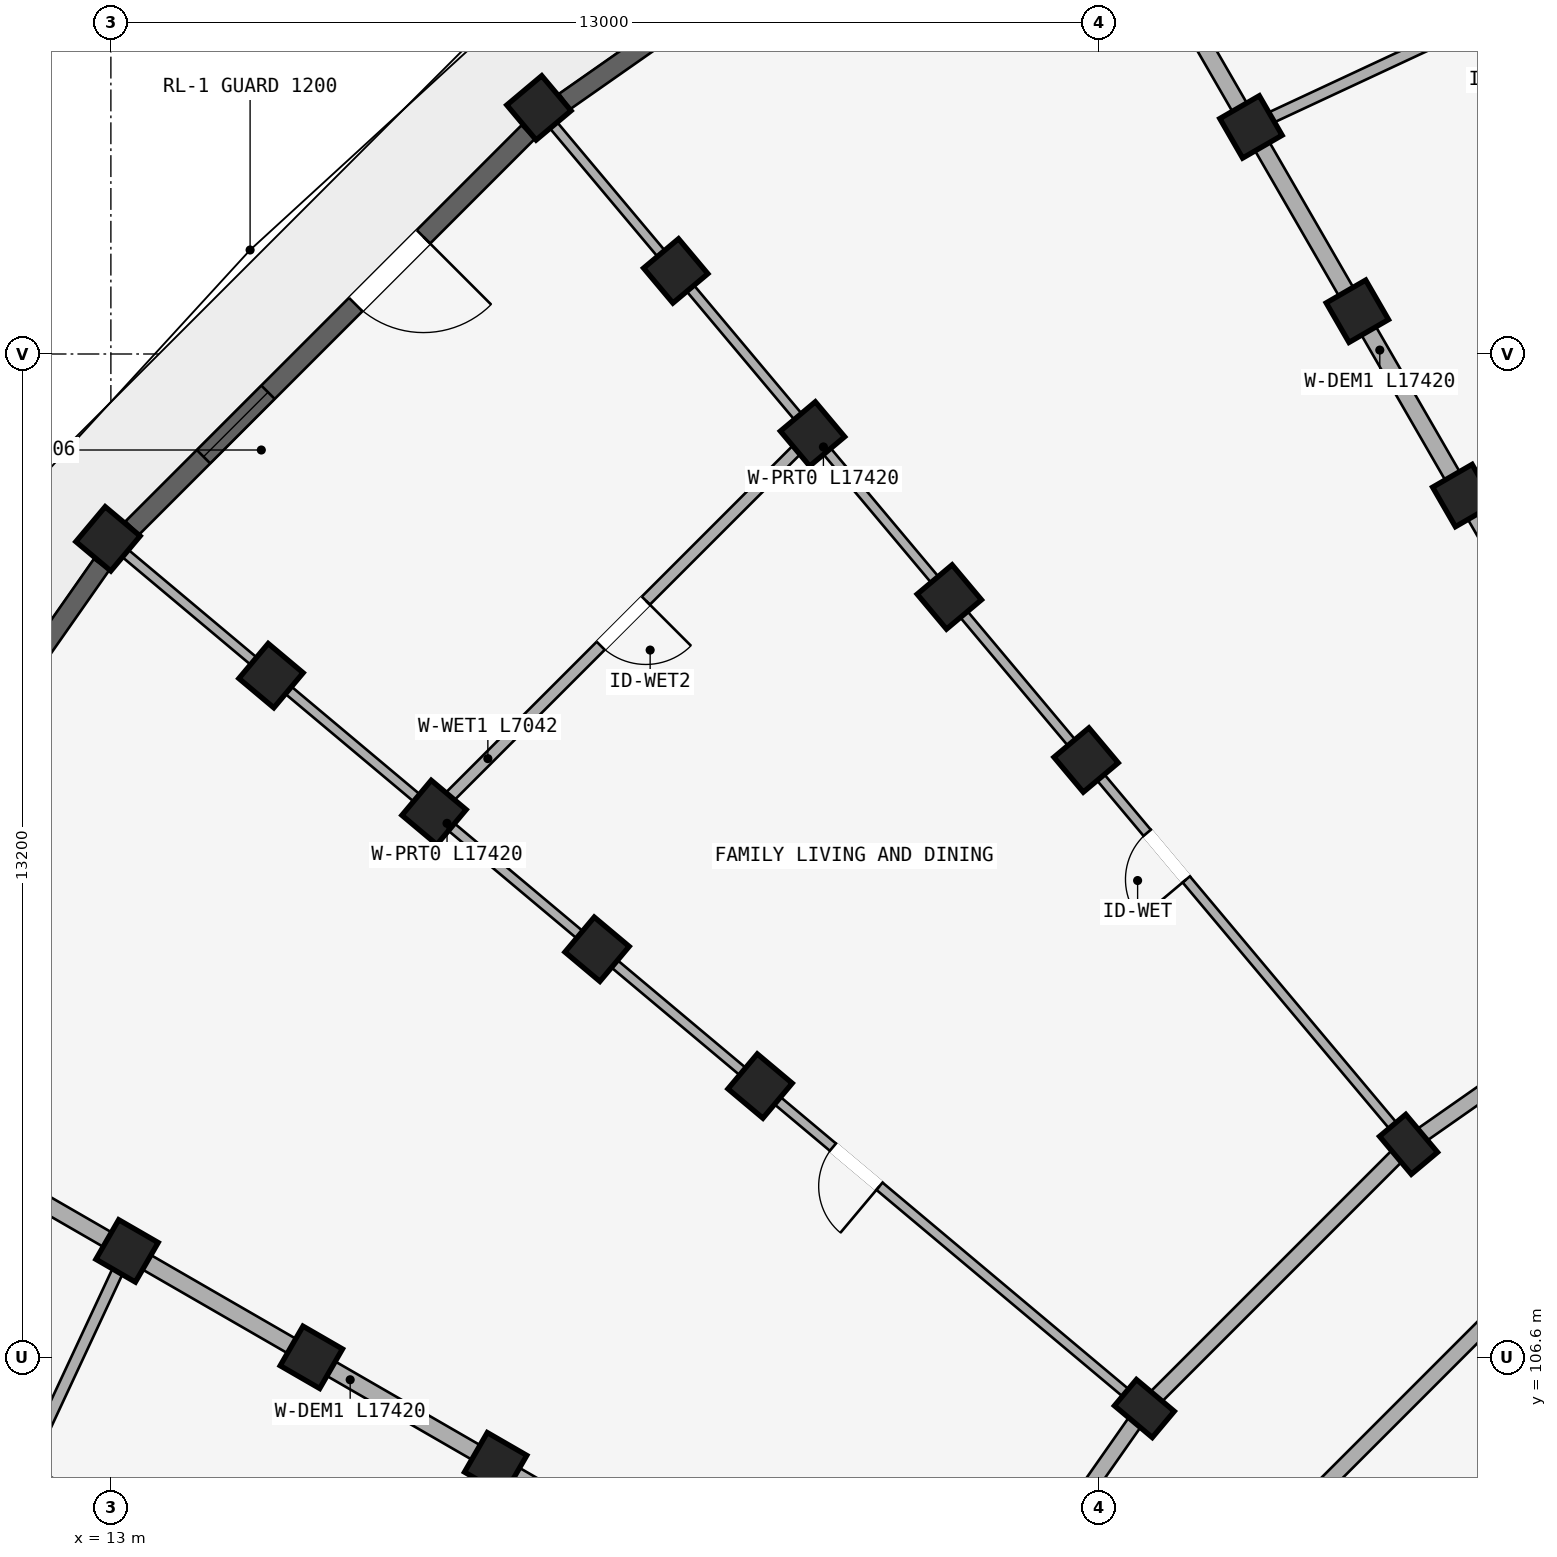
"""IFC4 building model, lengths in metres.
Left out: names, types, materials, properties, quantities, classifications, styles, units other than length and angle.
Written with IfcOpenShell. Run it as: python <this file> out.ifc"""

import sys

from ifc_helpers import new_model, si_unit, direction, frame, frame_2d, origin, origin_2d, place, context, subcontext, project, spatial, rectangle, extrude, element, fill, save


model = new_model("IFC4")
c1 = context("Model", 3, precision=1e-05, world=origin(), true_north=direction((0.0, 1.0)))
c2 = subcontext(c1, "Body", "Model", "MODEL_VIEW")
j1 = project(units=[si_unit("LENGTHUNIT", "METRE"), si_unit("PLANEANGLEUNIT", "RADIAN")], contexts=[c1])
p1 = place(None, origin())
s1 = spatial("IfcSite", under=j1, at=p1, CompositionType="ELEMENT")
p2 = place(p1, origin())
s2 = spatial("IfcBuilding", under=s1, at=p2, CompositionType="ELEMENT")
p3 = place(p2, frame((0.0, 0.0, 30.75)))
s3 = spatial("IfcBuildingStorey", under=s2, at=p3, CompositionType="ELEMENT", Elevation=30.75)
for number, where, z_axis, x_axis in (
    (1, (30.8, 117.938, 0.0), (0.0, 0.0, 1.0), (0.866, 0.5, 0.0)),
    (2, (29.4, 120.363, 0.0), (0.0, 0.0, 1.0), (0.866, 0.5, 0.0)),
    (3, (28.0, 122.787, 0.0), (0.0, 0.0, 1.0), (0.866, 0.5, 0.0)),
):
    element("IfcColumn", number, at=place(p3, frame(where, z_axis=z_axis, x_axis=x_axis)), inside=s3, PredefinedType="COLUMN", context=c2, shape_type="SweptSolid", body=[
        extrude(rectangle(XDim=0.6, YDim=0.6, at=origin_2d()), origin(), (0.0, 0.0, 1.0), 2.93),
    ])
p4 = place(p3, frame((30.073, 109.402, 0.0), z_axis=(0.0, 0.0, 1.0), x_axis=(0.766044443119, 0.642787609687, 0.0)))
e4 = element("IfcColumn", 4, at=p4, inside=s3, PredefinedType="COLUMN", context=c2, shape_type="SweptSolid", body=[
    extrude(rectangle(XDim=0.45, YDim=0.65, at=origin_2d()), origin(), (0.0, 0.0, 1.0), 2.93),
])
for number, where, z_axis, x_axis in (
    (5, (25.831, 114.458, 0.0), (0.0, 0.0, 1.0), (0.766, 0.643, 0.0)),
    (6, (24.031, 116.603, 0.0), (0.0, 0.0, 1.0), (0.766, 0.643, 0.0)),
    (7, (22.231, 118.748, 0.0), (0.0, 0.0, 1.0), (0.766, 0.643, 0.0)),
    (8, (20.432, 120.893, 0.0), (0.0, 0.0, 1.0), (0.766, 0.643, 0.0)),
    (9, (18.632, 123.038, 0.0), (0.0, 0.0, 1.0), (0.766, 0.643, 0.0)),
):
    element("IfcColumn", number, at=place(p3, frame(where, z_axis=z_axis, x_axis=x_axis)), inside=s3, PredefinedType="COLUMN", context=c2, shape_type="SweptSolid", body=[
        extrude(rectangle(XDim=0.6, YDim=0.6, at=origin_2d()), origin(), (0.0, 0.0, 1.0), 2.93),
    ])
p5 = place(p3, frame((26.598, 105.927, 0.0), z_axis=(0.0, 0.0, 1.0), x_axis=(0.642787609687, 0.766044443119, 0.0)))
e10 = element("IfcColumn", 10, at=p5, inside=s3, PredefinedType="COLUMN", context=c2, shape_type="SweptSolid", body=[
    extrude(rectangle(XDim=0.45, YDim=0.65, at=origin_2d()), origin(), (0.0, 0.0, 1.0), 2.93),
])
for number, where, z_axis, x_axis in (
    (11, (21.542, 110.169, 0.0), (0.0, 0.0, 1.0), (0.643, 0.766, 0.0)),
    (12, (19.397, 111.969, 0.0), (0.0, 0.0, 1.0), (0.643, 0.766, 0.0)),
    (13, (17.252, 113.769, 0.0), (0.0, 0.0, 1.0), (0.643, 0.766, 0.0)),
    (14, (15.107, 115.568, 0.0), (0.0, 0.0, 1.0), (0.643, 0.766, 0.0)),
    (15, (12.962, 117.368, 0.0), (0.0, 0.0, 1.0), (0.643, 0.766, 0.0)),
    (16, (18.062, 105.2, 0.0), (0.0, 0.0, 1.0), (0.5, 0.866, 0.0)),
    (17, (15.637, 106.6, 0.0), (0.0, 0.0, 1.0), (0.5, 0.866, 0.0)),
    (18, (13.213, 108.0, 0.0), (0.0, 0.0, 1.0), (0.5, 0.866, 0.0)),
):
    element("IfcColumn", number, at=place(p3, frame(where, z_axis=z_axis, x_axis=x_axis)), inside=s3, PredefinedType="COLUMN", context=c2, shape_type="SweptSolid", body=[
        extrude(rectangle(XDim=0.6, YDim=0.6, at=origin_2d()), origin(), (0.0, 0.0, 1.0), 2.93),
    ])
p6 = place(p3, frame((34.1, 112.222, 0.0), z_axis=(0.0, 0.0, 1.0), x_axis=(-0.819140911474, -0.573592335331, 0.0)))
e19 = element("IfcWall", 19, at=p6, inside=s3, PredefinedType="STANDARD", context=c2, shape_type="SweptSolid", body=[
    extrude(rectangle(XDim=4.916, YDim=0.2, at=frame_2d((2.458, 0.0))), origin(), (0.0, 0.0, 1.0), 2.372),
])
p7 = place(p6, frame((1.938, 0.0, 0.0)))
e20 = element("IfcOpeningElement", 20, at=p7, cuts=e19, PredefinedType="OPENING", context=c2, shape_type="SweptSolid", body=[
    extrude(rectangle(XDim=1.04, YDim=2.15, at=frame_2d((0.52, 1.075))), frame((0.0, 0.11, 0.0), z_axis=(0.0, -1.0, 0.0), x_axis=(1.0, 0.0, 0.0)), (0.0, 0.0, 1.0), 0.22),
])
p8 = place(p3, frame((31.616, 107.564, 0.0), z_axis=(0.0, 0.0, 1.0), x_axis=(-0.707106781187, -0.707106781187, 0.0)))
e21 = element("IfcWall", 21, at=p8, inside=s3, PredefinedType="STANDARD", context=c2, shape_type="SweptSolid", body=[
    extrude(rectangle(XDim=4.497, YDim=0.2, at=frame_2d((2.249, 0.0))), origin(), (0.0, 0.0, 1.0), 2.372),
])
p9 = place(p3, frame((30.073, 109.402, 0.0), z_axis=(0.0, 0.0, 1.0), x_axis=(-0.707106781187, -0.707106781187, 0.0)))
e22 = element("IfcWall", 22, at=p9, inside=s3, PredefinedType="STANDARD", context=c2, shape_type="SweptSolid", body=[
    extrude(rectangle(XDim=4.916, YDim=0.2, at=frame_2d((2.458, 0.0))), origin(), (0.0, 0.0, 1.0), 2.372),
])
p10 = place(p3, frame((26.598, 105.927, 0.0), z_axis=(0.0, 0.0, 1.0), x_axis=(-0.573592335331, -0.819140911474, 0.0)))
e23 = element("IfcWall", 23, at=p10, inside=s3, PredefinedType="STANDARD", context=c2, shape_type="SweptSolid", body=[
    extrude(rectangle(XDim=4.916, YDim=0.2, at=frame_2d((2.458, 0.0))), origin(), (0.0, 0.0, 1.0), 2.372),
])
p11 = place(p3, frame((34.05, 112.309, 0.0), z_axis=(0.0, 0.0, 1.0), x_axis=(-0.499997843263, 0.866026648973, 0.0)))
e24 = element("IfcWall", 24, at=p11, inside=s3, PredefinedType="STANDARD", context=c2, shape_type="SweptSolid", body=[
    extrude(rectangle(XDim=17.42, YDim=0.22, at=frame_2d((8.71, 0.0))), origin(), (0.0, 0.0, 1.0), 2.372),
])
p12 = place(p3, frame((30.009, 109.479, 0.0), z_axis=(0.0, 0.0, 1.0), x_axis=(-0.642784757967, 0.766046835987, 0.0)))
e25 = element("IfcWall", 25, at=p12, inside=s3, PredefinedType="PARTITIONING", context=c2, shape_type="SweptSolid", body=[
    extrude(rectangle(XDim=17.42, YDim=0.125, at=frame_2d((8.71, 0.0))), origin(), (0.0, 0.0, 1.0), 2.372),
])
p13 = place(p12, frame((4.45, 0.0, 0.0)))
e26 = element("IfcOpeningElement", 26, at=p13, cuts=e25, PredefinedType="OPENING", context=c2, shape_type="SweptSolid", body=[
    extrude(rectangle(XDim=0.8, YDim=2.1, at=frame_2d((0.4, 1.05))), frame((0.0, 0.073, 0.0), z_axis=(0.0, -1.0, 0.0), x_axis=(1.0, 0.0, 0.0)), (0.0, 0.0, 1.0), 0.145),
])
p14 = place(p3, frame((26.521, 105.991, 0.0), z_axis=(0.0, 0.0, 1.0), x_axis=(-0.766046835987, 0.642784757967, 0.0)))
e27 = element("IfcWall", 27, at=p14, inside=s3, PredefinedType="PARTITIONING", context=c2, shape_type="SweptSolid", body=[
    extrude(rectangle(XDim=17.42, YDim=0.125, at=frame_2d((8.71, 0.0))), origin(), (0.0, 0.0, 1.0), 2.372),
])
p15 = place(p14, frame((4.45, 0.0, 0.0)))
e28 = element("IfcOpeningElement", 28, at=p15, cuts=e27, PredefinedType="OPENING", context=c2, shape_type="SweptSolid", body=[
    extrude(rectangle(XDim=0.8, YDim=2.1, at=frame_2d((0.4, 1.05))), frame((0.0, 0.073, 0.0), z_axis=(0.0, -1.0, 0.0), x_axis=(1.0, 0.0, 0.0)), (0.0, 0.0, 1.0), 0.145),
])
p16 = place(p3, frame((23.691, 101.95, 0.0), z_axis=(0.0, 0.0, 1.0), x_axis=(-0.866026648973, 0.499997843263, 0.0)))
e29 = element("IfcWall", 29, at=p16, inside=s3, PredefinedType="STANDARD", context=c2, shape_type="SweptSolid", body=[
    extrude(rectangle(XDim=17.42, YDim=0.22, at=frame_2d((8.71, 0.0))), origin(), (0.0, 0.0, 1.0), 2.372),
])
p17 = place(p3, frame((34.382, 125.764, 0.0), z_axis=(0.0, 0.0, 1.0), x_axis=(-0.906297360311, -0.422640621205, 0.0)))
e30 = element("IfcWall", 30, at=p17, inside=s3, PredefinedType="PLUMBINGWALL", context=c2, shape_type="SweptSolid", body=[
    extrude(rectangle(XDim=7.042, YDim=0.15, at=frame_2d((3.521, 0.0))), origin(), (0.0, 0.0, 1.0), 2.372),
])
p18 = place(p17, frame((3.141, 0.0, 0.0)))
e31 = element("IfcOpeningElement", 31, at=p18, cuts=e30, PredefinedType="OPENING", context=c2, shape_type="SweptSolid", body=[
    extrude(rectangle(XDim=0.76, YDim=2.05, at=frame_2d((0.38, 1.025))), frame((0.0, 0.085, 0.0), z_axis=(0.0, -1.0, 0.0), x_axis=(1.0, 0.0, 0.0)), (0.0, 0.0, 1.0), 0.17),
])
p19 = place(p3, frame((22.231, 118.748, 0.0), z_axis=(0.0, 0.0, 1.0), x_axis=(-0.707106781187, -0.707106781187, 0.0)))
e32 = element("IfcWall", 32, at=p19, inside=s3, PredefinedType="PLUMBINGWALL", context=c2, shape_type="SweptSolid", body=[
    extrude(rectangle(XDim=7.042, YDim=0.15, at=frame_2d((3.521, 0.0))), origin(), (0.0, 0.0, 1.0), 2.372),
])
p20 = place(p19, frame((3.101, 0.0, 0.0)))
e33 = element("IfcOpeningElement", 33, at=p20, cuts=e32, PredefinedType="OPENING", context=c2, shape_type="SweptSolid", body=[
    extrude(rectangle(XDim=0.84, YDim=2.1, at=frame_2d((0.42, 1.05))), frame((0.0, 0.085, 0.0), z_axis=(0.0, -1.0, 0.0), x_axis=(1.0, 0.0, 0.0)), (0.0, 0.0, 1.0), 0.17),
])
p21 = place(p3, frame((13.213, 108.0, 0.0), z_axis=(0.0, 0.0, 1.0), x_axis=(-0.422640621205, -0.906297360311, 0.0)))
e34 = element("IfcWall", 34, at=p21, inside=s3, PredefinedType="PLUMBINGWALL", context=c2, shape_type="SweptSolid", body=[
    extrude(rectangle(XDim=7.042, YDim=0.15, at=frame_2d((3.521, 0.0))), origin(), (0.0, 0.0, 1.0), 2.372),
])
p22 = place(p21, frame((3.121, 0.0, 0.0)))
e35 = element("IfcOpeningElement", 35, at=p22, cuts=e34, PredefinedType="OPENING", context=c2, shape_type="SweptSolid", body=[
    extrude(rectangle(XDim=0.8, YDim=2.1, at=frame_2d((0.4, 1.05))), frame((0.0, 0.085, 0.0), z_axis=(0.0, -1.0, 0.0), x_axis=(1.0, 0.0, 0.0)), (0.0, 0.0, 1.0), 0.17),
])
p23 = place(p3, frame((25.005, 127.348, 0.0), z_axis=(0.0, 0.0, 1.0), x_axis=(-0.819147839112, -0.573582441919, 0.0)))
e36 = element("IfcWall", 36, at=p23, inside=s3, PredefinedType="STANDARD", context=c2, shape_type="SweptSolid", body=[
    extrude(rectangle(XDim=7.367, YDim=0.25, at=frame_2d((3.684, 0.0))), origin(), (0.0, 0.0, 1.0), 2.372),
])
p24 = place(p23, frame((2.783, 0.0, 0.522)))
e37 = element("IfcOpeningElement", 37, at=p24, cuts=e36, PredefinedType="OPENING", context=c2, shape_type="SweptSolid", body=[
    extrude(rectangle(XDim=1.8, YDim=1.65, at=frame_2d((0.9, 0.825))), frame((0.0, 0.135, 0.0), z_axis=(0.0, -1.0, 0.0), x_axis=(1.0, 0.0, 0.0)), (0.0, 0.0, 1.0), 0.27),
])
p25 = place(p3, frame((18.49, 122.719, 0.0), z_axis=(0.0, 0.0, 1.0), x_axis=(-0.707106781187, -0.707106781187, 0.0)))
e38 = element("IfcWall", 38, at=p25, inside=s3, PredefinedType="STANDARD", context=c2, shape_type="SweptSolid", body=[
    extrude(rectangle(XDim=7.367, YDim=0.25, at=frame_2d((3.684, 0.0))), origin(), (0.0, 0.0, 1.0), 2.372),
])
p26 = place(p25, frame((4.84, 0.0, 0.422)))
e39 = element("IfcOpeningElement", 39, at=p26, cuts=e38, PredefinedType="OPENING", context=c2, shape_type="SweptSolid", body=[
    extrude(rectangle(XDim=1.2, YDim=1.5, at=frame_2d((0.6, 0.75))), frame((0.0, 0.135, 0.0), z_axis=(0.0, -1.0, 0.0), x_axis=(1.0, 0.0, 0.0)), (0.0, 0.0, 1.0), 0.27),
])
p27 = place(p25, frame((1.948, 0.0, 0.0)))
e40 = element("IfcOpeningElement", 40, at=p27, cuts=e38, PredefinedType="OPENING", context=c2, shape_type="SweptSolid", body=[
    extrude(rectangle(XDim=1.26, YDim=2.15, at=frame_2d((0.63, 1.075))), frame((0.0, 0.135, 0.0), z_axis=(0.0, -1.0, 0.0), x_axis=(1.0, 0.0, 0.0)), (0.0, 0.0, 1.0), 0.27),
])
p28 = place(p3, frame((12.878, 117.03, 0.0), z_axis=(0.0, 0.0, 1.0), x_axis=(-0.573582441919, -0.819147839112, 0.0)))
e41 = element("IfcWall", 41, at=p28, inside=s3, PredefinedType="STANDARD", context=c2, shape_type="SweptSolid", body=[
    extrude(rectangle(XDim=7.367, YDim=0.25, at=frame_2d((3.684, 0.0))), origin(), (0.0, 0.0, 1.0), 2.372),
])
p29 = place(p28, frame((2.783, 0.0, 0.522)))
e42 = element("IfcOpeningElement", 42, at=p29, cuts=e41, PredefinedType="OPENING", context=c2, shape_type="SweptSolid", body=[
    extrude(rectangle(XDim=1.8, YDim=1.65, at=frame_2d((0.9, 0.825))), frame((0.0, 0.135, 0.0), z_axis=(0.0, -1.0, 0.0), x_axis=(1.0, 0.0, 0.0)), (0.0, 0.0, 1.0), 0.27),
])
p30 = place(p26, origin())
e43 = element("IfcWindow", 43, at=p30, inside=s3, PartitioningType="SINGLE_PANEL", PredefinedType="WINDOW", context=c2, shape_type="SweptSolid", body=[
    extrude(rectangle(XDim=1.2, YDim=1.5, at=frame_2d((0.6, 0.75))), frame((0.0, 0.03, 0.0), z_axis=(0.0, -1.0, 0.0), x_axis=(1.0, 0.0, 0.0)), (0.0, 0.0, 1.0), 0.06),
])
fill(e39, e43)
p31 = place(p13, frame((0.8, 0.0, 0.0), z_axis=(0.0, 0.0, 1.0), x_axis=(-1.0, 0.0, 0.0)))
e44 = element("IfcDoor", 44, at=p31, inside=s3, OperationType="SINGLE_SWING_RIGHT", PredefinedType="DOOR", context=c2, shape_type="SweptSolid", body=[
    extrude(rectangle(XDim=0.8, YDim=2.1, at=frame_2d((0.4, 1.05))), frame((0.0, 0.025, 0.0), z_axis=(0.0, -1.0, 0.0), x_axis=(1.0, 0.0, 0.0)), (0.0, 0.0, 1.0), 0.05),
])
fill(e26, e44)
p32 = place(p15, frame((0.8, 0.0, 0.0), z_axis=(0.0, 0.0, 1.0), x_axis=(-1.0, 0.0, 0.0)))
e45 = element("IfcDoor", 45, at=p32, inside=s3, OperationType="SINGLE_SWING_RIGHT", PredefinedType="DOOR", context=c2, shape_type="SweptSolid", body=[
    extrude(rectangle(XDim=0.8, YDim=2.1, at=frame_2d((0.4, 1.05))), frame((0.0, 0.025, 0.0), z_axis=(0.0, -1.0, 0.0), x_axis=(1.0, 0.0, 0.0)), (0.0, 0.0, 1.0), 0.05),
])
fill(e28, e45)
p33 = place(p20, frame((0.84, 0.0, 0.0), z_axis=(0.0, 0.0, 1.0), x_axis=(-1.0, 0.0, 0.0)))
e46 = element("IfcDoor", 46, at=p33, inside=s3, OperationType="SINGLE_SWING_RIGHT", PredefinedType="DOOR", context=c2, shape_type="SweptSolid", body=[
    extrude(rectangle(XDim=0.84, YDim=2.1, at=frame_2d((0.42, 1.05))), frame((0.0, 0.025, 0.0), z_axis=(0.0, -1.0, 0.0), x_axis=(1.0, 0.0, 0.0)), (0.0, 0.0, 1.0), 0.05),
])
fill(e33, e46)
p34 = place(p27, frame((1.26, 0.0, 0.0), z_axis=(0.0, 0.0, 1.0), x_axis=(-1.0, 0.0, 0.0)))
e47 = element("IfcDoor", 47, at=p34, inside=s3, OperationType="SINGLE_SWING_RIGHT", PredefinedType="DOOR", context=c2, shape_type="SweptSolid", body=[
    extrude(rectangle(XDim=1.26, YDim=2.15, at=frame_2d((0.63, 1.075))), frame((0.0, 0.025, 0.0), z_axis=(0.0, -1.0, 0.0), x_axis=(1.0, 0.0, 0.0)), (0.0, 0.0, 1.0), 0.05),
])
fill(e40, e47)
save(model, sys.argv[1])
